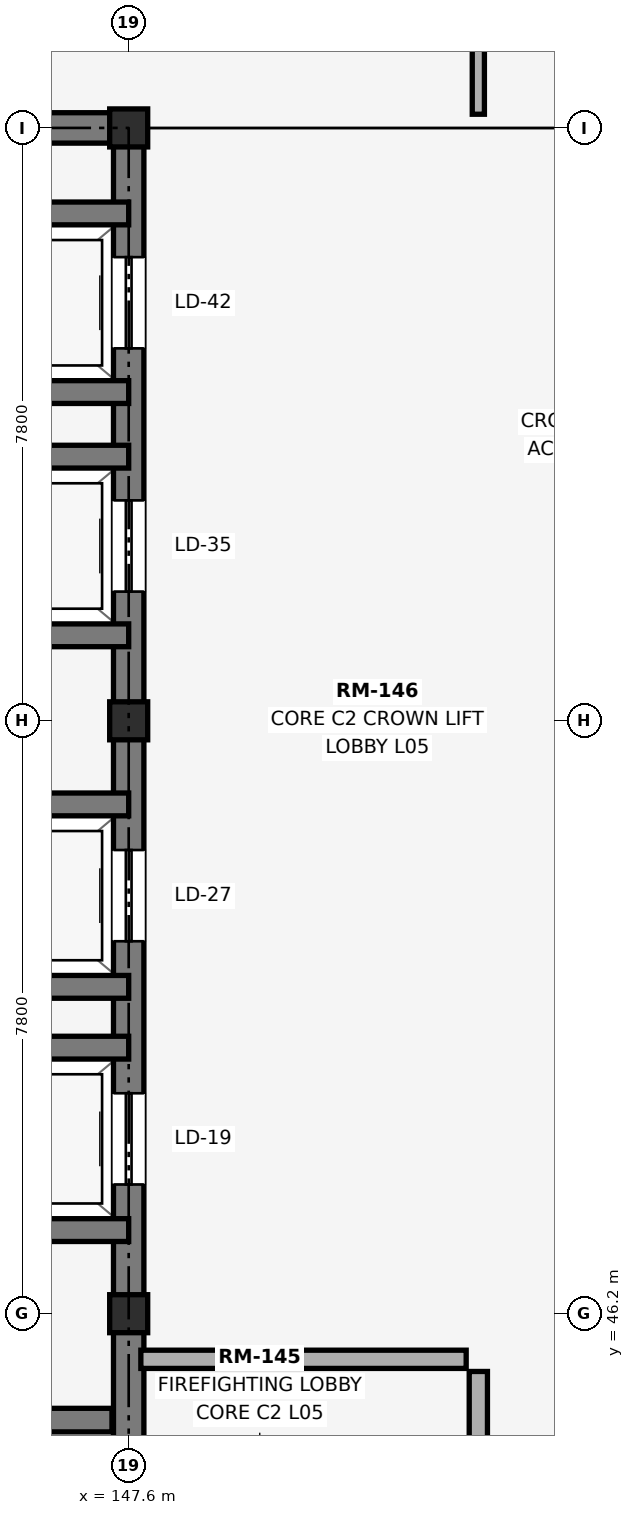
"""IFC4 building model, lengths in metres.
Left out: names, types, materials, properties, quantities, classifications, styles, units other than length and angle.
Written with IfcOpenShell. Run it as: python <this file> out.ifc"""

import sys

from ifc_helpers import new_model, si_unit, direction, frame, frame_2d, origin, origin_2d, place, context, subcontext, project, spatial, rectangle, extrude, element, fill, save


model = new_model("IFC4")
c1 = context("Model", 3, precision=1e-05, world=origin(), true_north=direction((0.0, 1.0)))
c2 = subcontext(c1, "Body", "Model", "MODEL_VIEW")
j1 = project(units=[si_unit("LENGTHUNIT", "METRE"), si_unit("PLANEANGLEUNIT", "RADIAN")], contexts=[c1])
p1 = place(None, origin())
s1 = spatial("IfcSite", under=j1, at=p1, CompositionType="ELEMENT")
p2 = place(p1, origin())
s2 = spatial("IfcBuilding", under=s1, at=p2, CompositionType="ELEMENT")
p3 = place(p2, frame((0.0, 0.0, 24.0)))
s3 = spatial("IfcBuildingStorey", under=s2, at=p3, CompositionType="ELEMENT", Elevation=24.0)
for number, where, z_axis, x_axis in (
    (1, (147.6, 46.2, 0.0), (0.0, 0.0, 1.0), (1.0, 0.0, 0.0)),
    (2, (147.6, 54.0, 0.0), (0.0, 0.0, 1.0), (1.0, 0.0, 0.0)),
    (3, (147.6, 61.8, 0.0), (0.0, 0.0, 1.0), (1.0, 0.0, 0.0)),
):
    element("IfcColumn", number, at=place(p3, frame(where, z_axis=z_axis, x_axis=x_axis)), inside=s3, PredefinedType="COLUMN", context=c2, shape_type="SweptSolid", body=[
        extrude(rectangle(XDim=0.5, YDim=0.5, at=origin_2d()), origin(), (0.0, 0.0, 1.0), 4.5),
    ])
p4 = place(p3, frame((137.8, 61.8, 0.0), z_axis=(0.0, 0.0, 1.0), x_axis=(1.0, 0.0, 0.0)))
e4 = element("IfcWall", 4, at=p4, inside=s3, PredefinedType="SHEAR", context=c2, shape_type="SweptSolid", body=[
    extrude(rectangle(XDim=10.0, YDim=0.4, at=frame_2d((5.0, 0.0))), origin(), (0.0, 0.0, 1.0), 4.5),
])
p5 = place(p3, frame((147.6, 38.6, 0.0), z_axis=(0.0, 0.0, 1.0), x_axis=(0.0, 1.0, 0.0)))
e5 = element("IfcWall", 5, at=p5, inside=s3, PredefinedType="SHEAR", context=c2, shape_type="SweptSolid", body=[
    extrude(rectangle(XDim=23.0, YDim=0.4, at=frame_2d((11.5, 0.0))), origin(), (0.0, 0.0, 1.0), 4.5),
])
p6 = place(p5, frame((9.3, 0.0, 0.0)))
e6 = element("IfcOpeningElement", 6, at=p6, cuts=e5, PredefinedType="OPENING", context=c2, shape_type="SweptSolid", body=[
    extrude(rectangle(XDim=1.2, YDim=2.2, at=frame_2d((0.6, 1.1))), frame((0.0, 0.21, 0.0), z_axis=(0.0, -1.0, 0.0), x_axis=(1.0, 0.0, 0.0)), (0.0, 0.0, 1.0), 0.42),
])
p7 = place(p5, frame((12.5, 0.0, 0.0)))
e7 = element("IfcOpeningElement", 7, at=p7, cuts=e5, PredefinedType="OPENING", context=c2, shape_type="SweptSolid", body=[
    extrude(rectangle(XDim=1.2, YDim=2.2, at=frame_2d((0.6, 1.1))), frame((0.0, 0.21, 0.0), z_axis=(0.0, -1.0, 0.0), x_axis=(1.0, 0.0, 0.0)), (0.0, 0.0, 1.0), 0.42),
])
p8 = place(p5, frame((17.1, 0.0, 0.0)))
e8 = element("IfcOpeningElement", 8, at=p8, cuts=e5, PredefinedType="OPENING", context=c2, shape_type="SweptSolid", body=[
    extrude(rectangle(XDim=1.2, YDim=2.2, at=frame_2d((0.6, 1.1))), frame((0.0, 0.21, 0.0), z_axis=(0.0, -1.0, 0.0), x_axis=(1.0, 0.0, 0.0)), (0.0, 0.0, 1.0), 0.42),
])
p9 = place(p5, frame((20.3, 0.0, 0.0)))
e9 = element("IfcOpeningElement", 9, at=p9, cuts=e5, PredefinedType="OPENING", context=c2, shape_type="SweptSolid", body=[
    extrude(rectangle(XDim=1.2, YDim=2.2, at=frame_2d((0.6, 1.1))), frame((0.0, 0.21, 0.0), z_axis=(0.0, -1.0, 0.0), x_axis=(1.0, 0.0, 0.0)), (0.0, 0.0, 1.0), 0.42),
])
p10 = place(p5, frame((2.4, 0.0, 0.0)))
e10 = element("IfcOpeningElement", 10, at=p10, cuts=e5, PredefinedType="OPENING", context=c2, shape_type="SweptSolid", body=[
    extrude(rectangle(XDim=1.1, YDim=2.2, at=frame_2d((0.55, 1.1))), frame((0.0, 0.21, 0.0), z_axis=(0.0, -1.0, 0.0), x_axis=(1.0, 0.0, 0.0)), (0.0, 0.0, 1.0), 0.42),
])
p11 = place(p3, frame((138.22, 44.8, 0.0), z_axis=(0.0, 0.0, 1.0), x_axis=(1.0, 0.0, 0.0)))
e11 = element("IfcWall", 11, at=p11, inside=s3, PredefinedType="SHEAR", context=c2, shape_type="SweptSolid", body=[
    extrude(rectangle(XDim=9.16, YDim=0.31, at=frame_2d((4.58, 0.0))), origin(), (0.0, 0.0, 1.0), 4.5),
])
for number, where, z_axis, x_axis in (
    (12, (144.75, 47.3, 0.0), (0.0, 0.0, 1.0), (1.0, 0.0, 0.0)),
    (13, (144.75, 49.7, 0.0), (0.0, 0.0, 1.0), (1.0, 0.0, 0.0)),
    (14, (144.75, 50.5, 0.0), (0.0, 0.0, 1.0), (1.0, 0.0, 0.0)),
    (15, (144.75, 52.9, 0.0), (0.0, 0.0, 1.0), (1.0, 0.0, 0.0)),
):
    element("IfcWall", number, at=place(p3, frame(where, z_axis=z_axis, x_axis=x_axis)), inside=s3, PredefinedType="SHEAR", context=c2, shape_type="SweptSolid", body=[
        extrude(rectangle(XDim=2.85, YDim=0.3, at=frame_2d((1.425, 0.0))), origin(), (0.0, 0.0, 1.0), 4.5),
    ])
for number, where, z_axis, x_axis in (
    (16, (144.8, 55.125, 0.0), (0.0, 0.0, 1.0), (1.0, 0.0, 0.0)),
    (17, (144.8, 57.475, 0.0), (0.0, 0.0, 1.0), (1.0, 0.0, 0.0)),
    (18, (144.8, 58.325, 0.0), (0.0, 0.0, 1.0), (1.0, 0.0, 0.0)),
    (19, (144.8, 60.675, 0.0), (0.0, 0.0, 1.0), (1.0, 0.0, 0.0)),
):
    element("IfcWall", number, at=place(p3, frame(where, z_axis=z_axis, x_axis=x_axis)), inside=s3, PredefinedType="SHEAR", context=c2, shape_type="SweptSolid", body=[
        extrude(rectangle(XDim=2.8, YDim=0.3, at=frame_2d((1.4, 0.0))), origin(), (0.0, 0.0, 1.0), 5.3),
    ])
p12 = place(p3, frame((147.76, 45.6, 0.0), z_axis=(0.0, 0.0, 1.0), x_axis=(1.0, 0.0, 0.0)))
e20 = element("IfcWall", 20, at=p12, inside=s3, PredefinedType="PARTITIONING", context=c2, shape_type="SweptSolid", body=[
    extrude(rectangle(XDim=4.28, YDim=0.24, at=frame_2d((2.14, 0.0))), origin(), (0.0, 0.0, 1.0), 4.19),
])
p13 = place(p3, frame((152.2, 38.56, 0.0), z_axis=(0.0, 0.0, 1.0), x_axis=(0.0, 1.0, 0.0)))
e21 = element("IfcWall", 21, at=p13, inside=s3, PredefinedType="PARTITIONING", context=c2, shape_type="SweptSolid", body=[
    extrude(rectangle(XDim=6.88, YDim=0.24, at=frame_2d((3.44, 0.0))), origin(), (0.0, 0.0, 1.0), 4.19),
])
p14 = place(p13, frame((1.9, 0.0, 0.0)))
e22 = element("IfcOpeningElement", 22, at=p14, cuts=e21, PredefinedType="OPENING", context=c2, shape_type="SweptSolid", body=[
    extrude(rectangle(XDim=1.8, YDim=2.3, at=frame_2d((0.9, 1.15))), frame((0.0, 0.13, 0.0), z_axis=(0.0, -1.0, 0.0), x_axis=(1.0, 0.0, 0.0)), (0.0, 0.0, 1.0), 0.26),
])
p15 = place(p3, frame((152.2, 61.98, 0.0), z_axis=(0.0, 0.0, 1.0), x_axis=(0.0, 1.0, 0.0)))
e23 = element("IfcWall", 23, at=p15, inside=s3, PredefinedType="PARTITIONING", context=c2, shape_type="SweptSolid", body=[
    extrude(rectangle(XDim=15.29, YDim=0.16, at=frame_2d((7.645, 0.0))), origin(), (0.0, 0.0, 1.0), 4.19),
])
p16 = place(p15, frame((4.2, 0.0, 0.0)))
e24 = element("IfcOpeningElement", 24, at=p16, cuts=e23, PredefinedType="OPENING", context=c2, shape_type="SweptSolid", body=[
    extrude(rectangle(XDim=0.95, YDim=2.15, at=frame_2d((0.475, 1.075))), frame((0.0, 0.09, 0.0), z_axis=(0.0, -1.0, 0.0), x_axis=(1.0, 0.0, 0.0)), (0.0, 0.0, 1.0), 0.18),
])
p17 = place(p6, origin())
e25 = element("IfcDoor", 25, at=p17, inside=s3, OperationType="SLIDING_TO_LEFT", PredefinedType="DOOR", context=c2, shape_type="SweptSolid", body=[
    extrude(rectangle(XDim=1.2, YDim=2.2, at=frame_2d((0.6, 1.1))), frame((0.0, 0.025, 0.0), z_axis=(0.0, -1.0, 0.0), x_axis=(1.0, 0.0, 0.0)), (0.0, 0.0, 1.0), 0.05),
])
fill(e6, e25)
p18 = place(p7, origin())
e26 = element("IfcDoor", 26, at=p18, inside=s3, OperationType="SLIDING_TO_LEFT", PredefinedType="DOOR", context=c2, shape_type="SweptSolid", body=[
    extrude(rectangle(XDim=1.2, YDim=2.2, at=frame_2d((0.6, 1.1))), frame((0.0, 0.025, 0.0), z_axis=(0.0, -1.0, 0.0), x_axis=(1.0, 0.0, 0.0)), (0.0, 0.0, 1.0), 0.05),
])
fill(e7, e26)
p19 = place(p8, origin())
e27 = element("IfcDoor", 27, at=p19, inside=s3, OperationType="SLIDING_TO_LEFT", PredefinedType="DOOR", context=c2, shape_type="SweptSolid", body=[
    extrude(rectangle(XDim=1.2, YDim=2.2, at=frame_2d((0.6, 1.1))), frame((0.0, 0.025, 0.0), z_axis=(0.0, -1.0, 0.0), x_axis=(1.0, 0.0, 0.0)), (0.0, 0.0, 1.0), 0.05),
])
fill(e8, e27)
p20 = place(p9, origin())
e28 = element("IfcDoor", 28, at=p20, inside=s3, OperationType="SLIDING_TO_RIGHT", PredefinedType="DOOR", context=c2, shape_type="SweptSolid", body=[
    extrude(rectangle(XDim=1.2, YDim=2.2, at=frame_2d((0.6, 1.1))), frame((0.0, 0.025, 0.0), z_axis=(0.0, -1.0, 0.0), x_axis=(1.0, 0.0, 0.0)), (0.0, 0.0, 1.0), 0.05),
])
fill(e9, e28)
save(model, sys.argv[1])
